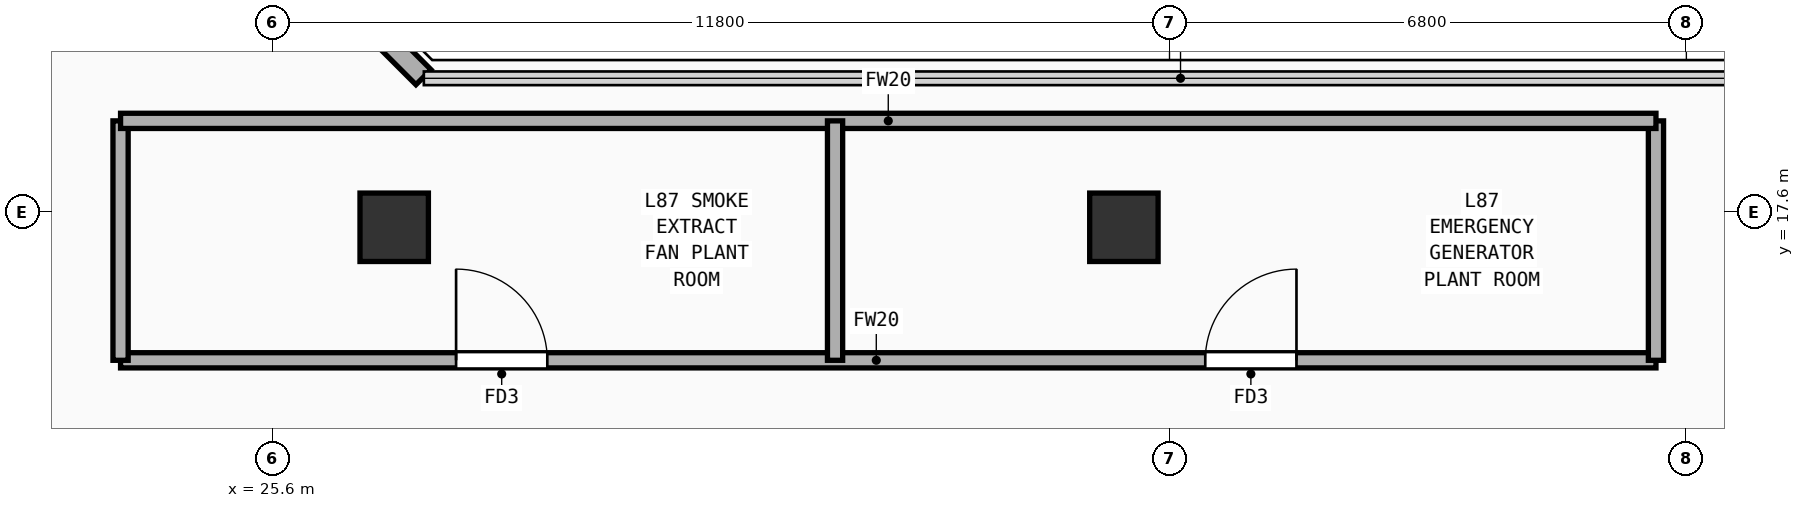
"""IFC4 building model, lengths in metres.
Left out: names, types, materials, properties, quantities, classifications, styles, units other than length and angle.
Written with IfcOpenShell. Run it as: python <this file> out.ifc"""

import sys

from ifc_helpers import new_model, si_unit, direction, frame, frame_2d, origin, origin_2d, place, context, subcontext, project, spatial, rectangle, extrude, element, fill, save


model = new_model("IFC4")
c1 = context("Model", 3, precision=1e-05, world=origin(), true_north=direction((0.0, 1.0)))
c2 = subcontext(c1, "Body", "Model", "MODEL_VIEW")
j1 = project(units=[si_unit("LENGTHUNIT", "METRE"), si_unit("PLANEANGLEUNIT", "RADIAN")], contexts=[c1])
p1 = place(None, origin())
s1 = spatial("IfcSite", under=j1, at=p1, CompositionType="ELEMENT")
p2 = place(p1, origin())
s2 = spatial("IfcBuilding", under=s1, at=p2, CompositionType="ELEMENT")
p3 = place(p2, frame((0.0, 0.0, 338.8)))
s3 = spatial("IfcBuildingStorey", under=s2, at=p3, CompositionType="ELEMENT", Elevation=338.8)
for number, where, z_axis, x_axis in (
    (1, (27.2, 17.4, 0.0), (0.0, 0.0, 1.0), (1.0, 0.0, 0.0)),
    (2, (36.8, 17.4, 0.0), (0.0, 0.0, 1.0), (1.0, 0.0, 0.0)),
):
    element("IfcColumn", number, at=place(p3, frame(where, z_axis=z_axis, x_axis=x_axis)), inside=s3, PredefinedType="COLUMN", context=c2, shape_type="SweptSolid", body=[
        extrude(rectangle(XDim=0.9, YDim=0.9, at=origin_2d()), origin(), (0.0, 0.0, 1.0), 5.02),
    ])
p4 = place(p3, frame((27.585, 19.375, 0.0), z_axis=(0.0, 0.0, 1.0), x_axis=(-0.707106781187, 0.707106781187, 0.0)))
e3 = element("IfcWall", 3, at=p4, inside=s3, PredefinedType="SOLIDWALL", context=c2, shape_type="SweptSolid", body=[
    extrude(rectangle(XDim=9.207, YDim=0.28, at=frame_2d((4.603, 0.0))), origin(), (0.0, 0.0, 1.0), 5.02),
])
p5 = place(p3, frame((23.6, 15.65, 0.0), z_axis=(0.0, 0.0, 1.0), x_axis=(1.0, 0.0, 0.0)))
e4 = element("IfcWall", 4, at=p5, inside=s3, PredefinedType="PARTITIONING", context=c2, shape_type="SweptSolid", body=[
    extrude(rectangle(XDim=20.2, YDim=0.2, at=frame_2d((10.1, 0.0))), origin(), (0.0, 0.0, 1.0), 4.72),
])
p6 = place(p5, frame((4.414, 0.0, 0.0)))
e5 = element("IfcOpeningElement", 5, at=p6, cuts=e4, PredefinedType="OPENING", context=c2, shape_type="SweptSolid", body=[
    extrude(rectangle(XDim=1.2, YDim=2.25, at=frame_2d((0.6, 1.125))), frame((0.0, 0.11, 0.0), z_axis=(0.0, -1.0, 0.0), x_axis=(1.0, 0.0, 0.0)), (0.0, 0.0, 1.0), 0.22),
])
p7 = place(p5, frame((14.271, 0.0, 0.0)))
e6 = element("IfcOpeningElement", 6, at=p7, cuts=e4, PredefinedType="OPENING", context=c2, shape_type="SweptSolid", body=[
    extrude(rectangle(XDim=1.2, YDim=2.25, at=frame_2d((0.6, 1.125))), frame((0.0, 0.11, 0.0), z_axis=(0.0, -1.0, 0.0), x_axis=(1.0, 0.0, 0.0)), (0.0, 0.0, 1.0), 0.22),
])
for number, where, z_axis, x_axis in (
    (7, (23.6, 15.65, 0.0), (0.0, 0.0, 1.0), (0.0, 1.0, 0.0)),
    (8, (43.8, 15.65, 0.0), (0.0, 0.0, 1.0), (0.0, 1.0, 0.0)),
):
    element("IfcWall", number, at=place(p3, frame(where, z_axis=z_axis, x_axis=x_axis)), inside=s3, PredefinedType="PARTITIONING", context=c2, shape_type="SweptSolid", body=[
        extrude(rectangle(XDim=3.15, YDim=0.2, at=frame_2d((1.575, 0.0))), origin(), (0.0, 0.0, 1.0), 5.02),
    ])
p8 = place(p3, frame((23.6, 18.8, 0.0), z_axis=(0.0, 0.0, 1.0), x_axis=(1.0, 0.0, 0.0)))
e9 = element("IfcWall", 9, at=p8, inside=s3, PredefinedType="PARTITIONING", context=c2, shape_type="SweptSolid", body=[
    extrude(rectangle(XDim=20.2, YDim=0.2, at=frame_2d((10.1, 0.0))), origin(), (0.0, 0.0, 1.0), 5.02),
])
p9 = place(p3, frame((33.0, 15.65, 0.0), z_axis=(0.0, 0.0, 1.0), x_axis=(0.0, 1.0, 0.0)))
e10 = element("IfcWall", 10, at=p9, inside=s3, PredefinedType="PARTITIONING", context=c2, shape_type="SweptSolid", body=[
    extrude(rectangle(XDim=3.15, YDim=0.2, at=frame_2d((1.575, 0.0))), origin(), (0.0, 0.0, 1.0), 5.02),
])
p10 = place(p6, origin())
e11 = element("IfcDoor", 11, at=p10, inside=s3, OperationType="SINGLE_SWING_LEFT", PredefinedType="DOOR", context=c2, shape_type="SweptSolid", body=[
    extrude(rectangle(XDim=1.2, YDim=2.25, at=frame_2d((0.6, 1.125))), frame((0.0, 0.025, 0.0), z_axis=(0.0, -1.0, 0.0), x_axis=(1.0, 0.0, 0.0)), (0.0, 0.0, 1.0), 0.05),
])
fill(e5, e11)
p11 = place(p7, origin())
e12 = element("IfcDoor", 12, at=p11, inside=s3, OperationType="SINGLE_SWING_RIGHT", PredefinedType="DOOR", context=c2, shape_type="SweptSolid", body=[
    extrude(rectangle(XDim=1.2, YDim=2.25, at=frame_2d((0.6, 1.125))), frame((0.0, 0.025, 0.0), z_axis=(0.0, -1.0, 0.0), x_axis=(1.0, 0.0, 0.0)), (0.0, 0.0, 1.0), 0.05),
])
fill(e6, e12)
save(model, sys.argv[1])
